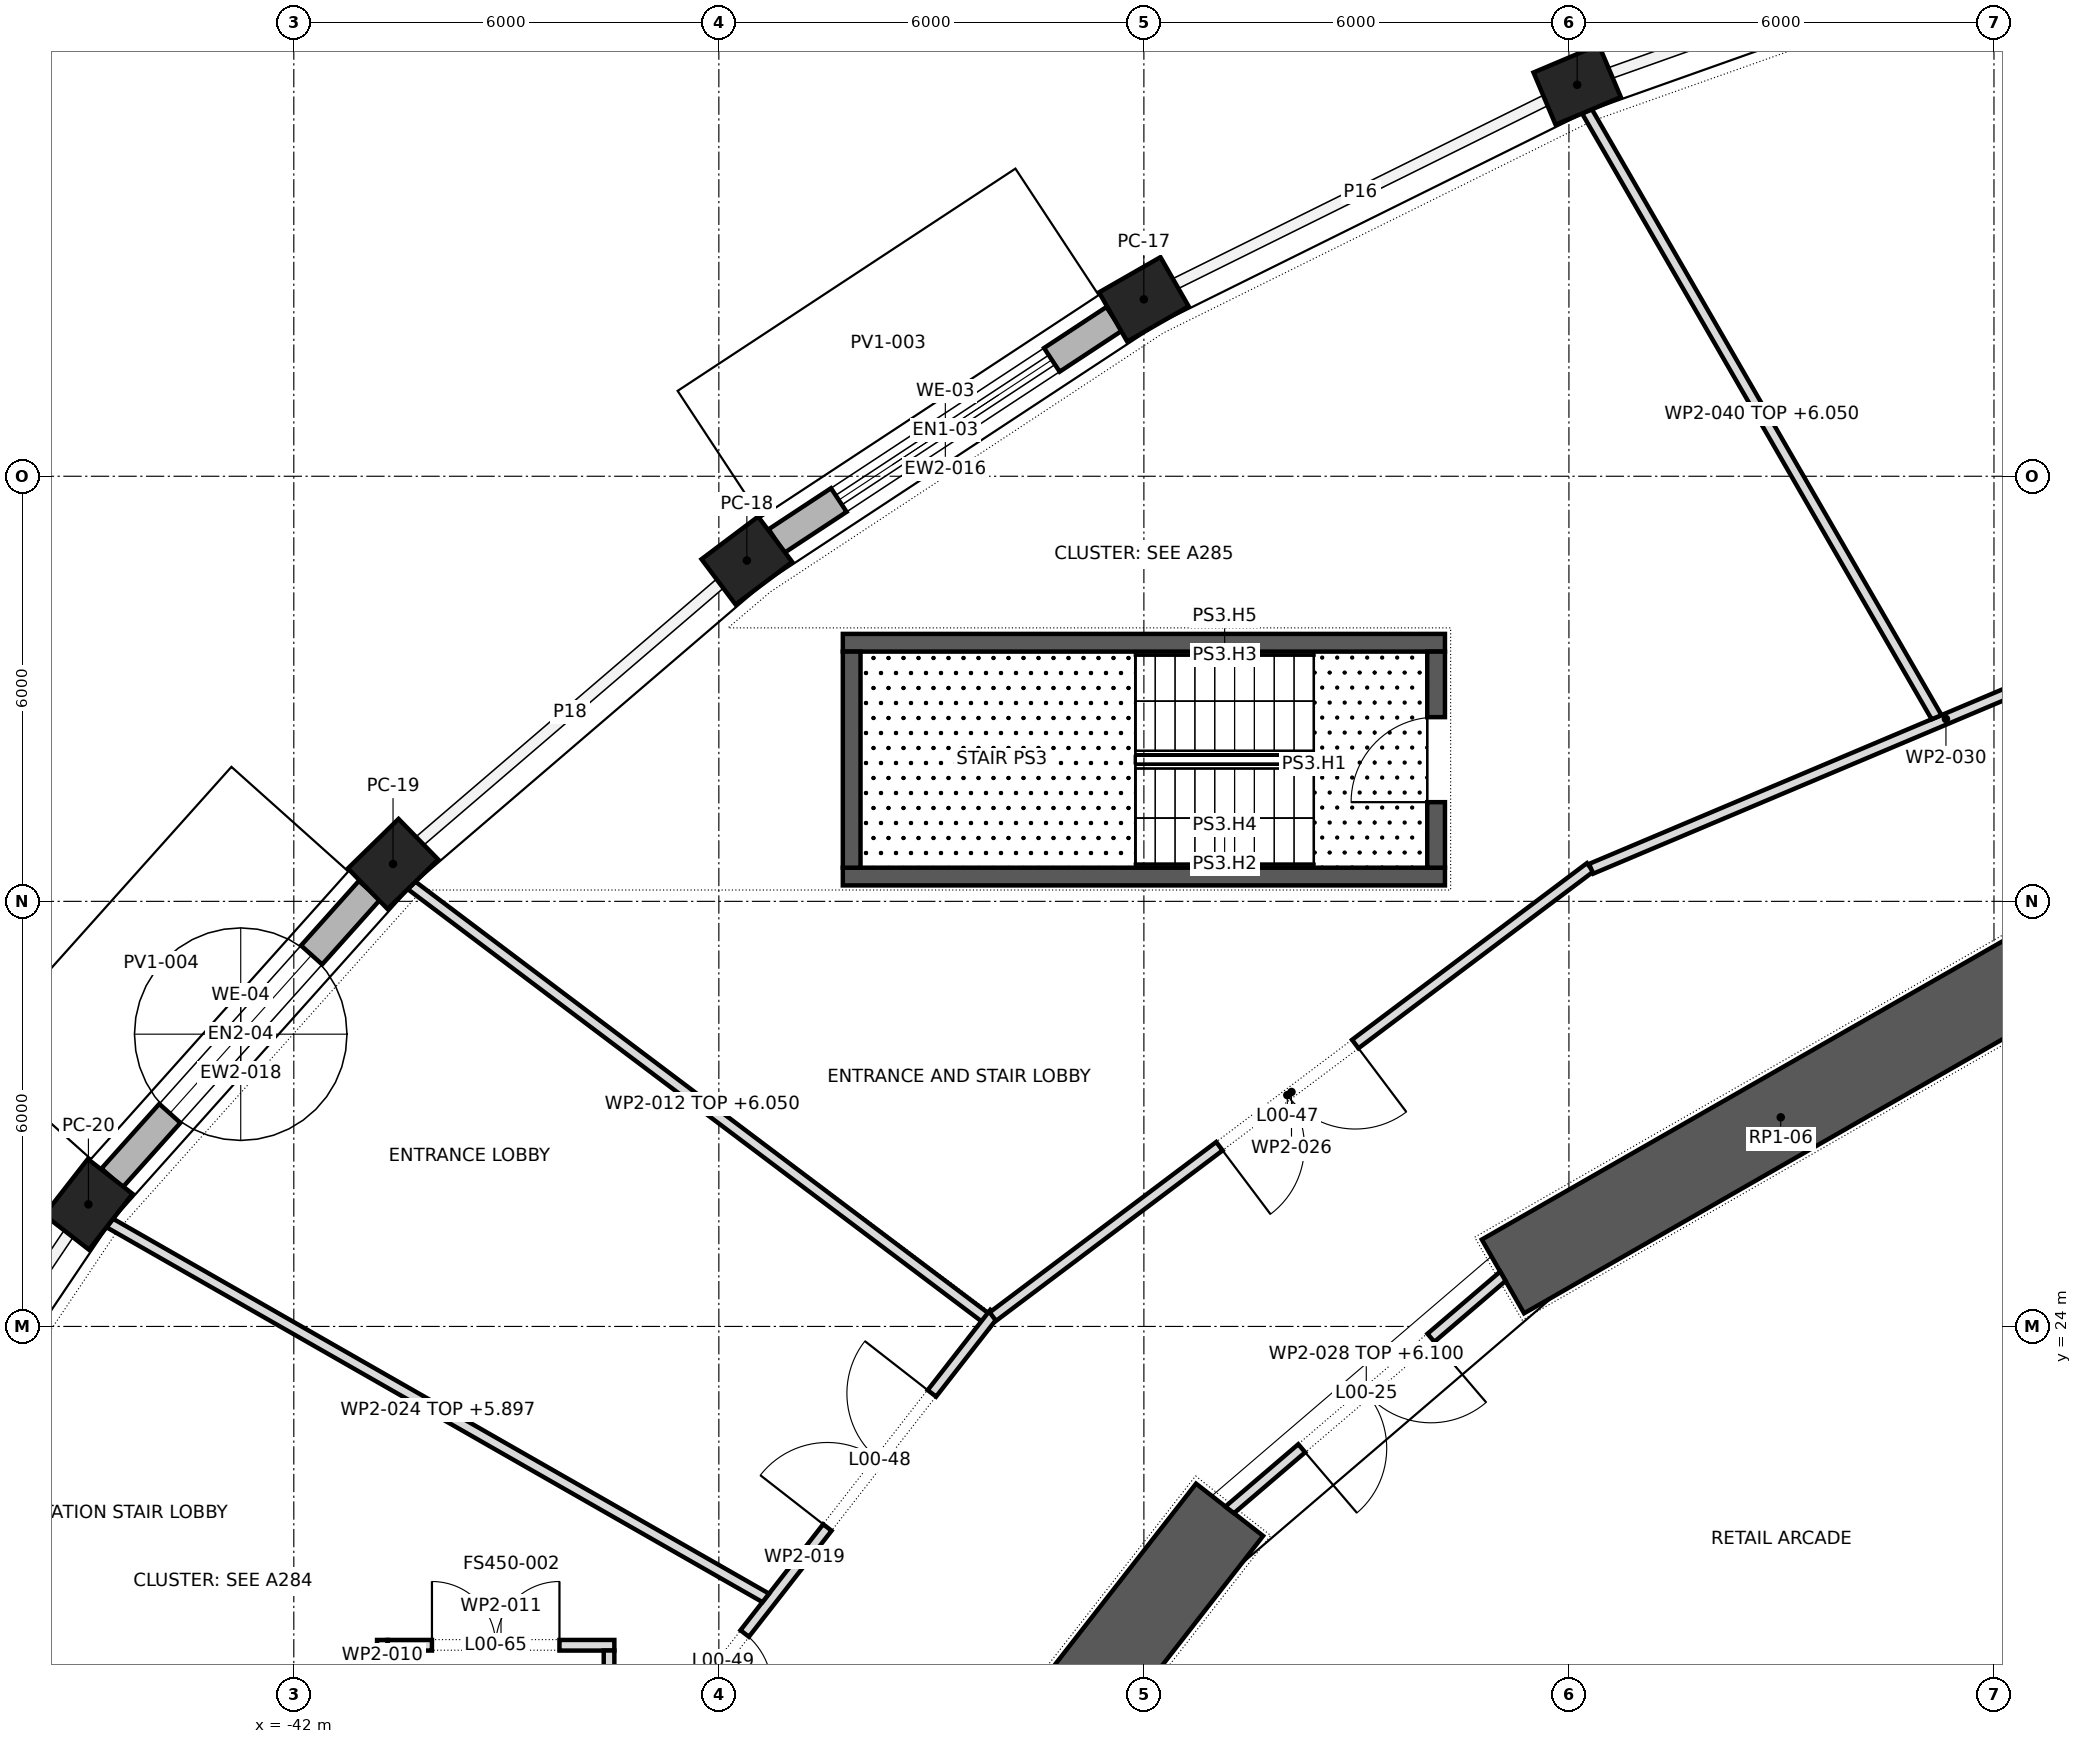
"""IFC4 building model, lengths in metres.
Left out: names, types, materials, properties, quantities, classifications, styles, units other than length and angle.
Written with IfcOpenShell. Run it as: python <this file> out.ifc"""

import sys

from ifc_helpers import new_model, si_unit, direction, frame, frame_2d, origin, origin_2d, place, context, subcontext, project, spatial, polyline, rectangle, outline, extrude, element, fill, save


model = new_model("IFC4")
c1 = context("Model", 3, precision=1e-05, world=origin(), true_north=direction((0.0, 1.0)))
c2 = subcontext(c1, "Body", "Model", "MODEL_VIEW")
j1 = project(units=[si_unit("LENGTHUNIT", "METRE"), si_unit("PLANEANGLEUNIT", "RADIAN")], contexts=[c1])
p1 = place(None, origin())
s1 = spatial("IfcSite", under=j1, at=p1, CompositionType="ELEMENT")
p2 = place(p1, origin())
s2 = spatial("IfcBuilding", under=s1, at=p2, CompositionType="ELEMENT")
p3 = place(p2, origin())
s3 = spatial("IfcBuildingStorey", under=s2, at=p3, CompositionType="ELEMENT", Elevation=0.0)
for number, where, z_axis, x_axis in (
    (1, (-23.884, 41.525, 0.0), (0.0, 0.0, 1.0), (-0.921, -0.389, 0.0)),
    (2, (-30.001, 38.497, 0.0), (0.0, 0.0, 1.0), (-0.868, -0.497, 0.0)),
    (3, (-35.605, 34.81, 0.0), (0.0, 0.0, 1.0), (-0.799, -0.601, 0.0)),
    (4, (-40.599, 30.528, 0.0), (0.0, 0.0, 1.0), (-0.715, -0.699, 0.0)),
    (5, (-44.899, 25.723, 0.0), (0.0, 0.0, 1.0), (-0.615, -0.789, 0.0)),
):
    element("IfcColumn", number, at=place(p3, frame(where, z_axis=z_axis, x_axis=x_axis)), inside=s3, PredefinedType="COLUMN", context=c2, shape_type="SweptSolid", body=[
        extrude(rectangle(XDim=1.0, YDim=0.8, at=origin_2d()), origin(), (0.0, 0.0, 1.0), 7.0),
    ])
p4 = place(p3, frame((-17.089, 29.198, 0.0), z_axis=(0.0, 0.0, 1.0), x_axis=(-0.867760656864, -0.496982336103, 0.0)))
e6 = element("IfcWall", 6, at=p4, inside=s3, PredefinedType="SHEAR", context=c2, shape_type="SweptSolid", body=[
    extrude(rectangle(XDim=9.038, YDim=1.2, at=frame_2d((4.519, 0.0))), origin(), (0.0, 0.0, 1.0), 7.0),
])
p5 = place(p3, frame((-28.79, 21.412, 0.0), z_axis=(0.0, 0.0, 1.0), x_axis=(-0.614825322247, -0.788663314174, 0.0)))
e7 = element("IfcWall", 7, at=p5, inside=s3, PredefinedType="SHEAR", context=c2, shape_type="SweptSolid", body=[
    extrude(rectangle(XDim=8.632, YDim=1.2, at=frame_2d((4.316, 0.0))), origin(), (0.0, 0.0, 1.0), 7.0),
])
p6 = place(p3, frame((-30.418, 38.222, 0.0), z_axis=(0.0, 0.0, 1.0), x_axis=(-0.835417082244, -0.549616501476, 0.0)))
e8 = element("IfcWall", 8, at=p6, inside=s3, PredefinedType="STANDARD", context=c2, shape_type="SweptSolid", body=[
    extrude(rectangle(XDim=5.708, YDim=0.4, at=frame_2d((2.854, 0.0))), origin(), (0.0, 0.0, 1.0), 6.2),
])
p7 = place(p6, frame((1.054, 0.0, 0.0)))
e9 = element("IfcOpeningElement", 9, at=p7, cuts=e8, PredefinedType="OPENING", context=c2, shape_type="SweptSolid", body=[
    extrude(rectangle(XDim=3.6, YDim=3.0, at=frame_2d((1.8, 1.5))), frame((0.0, 0.212, 0.0), z_axis=(0.0, -1.0, 0.0), x_axis=(1.0, 0.0, 0.0)), (0.0, 0.0, 1.0), 0.424),
])
p8 = place(p6, frame((1.054, 0.0, 3.45)))
e10 = element("IfcOpeningElement", 10, at=p8, cuts=e8, PredefinedType="OPENING", context=c2, shape_type="SweptSolid", body=[
    extrude(rectangle(XDim=3.6, YDim=2.25, at=frame_2d((1.8, 1.125))), frame((0.0, 0.212, 0.0), z_axis=(0.0, -1.0, 0.0), x_axis=(1.0, 0.0, 0.0)), (0.0, 0.0, 1.0), 0.424),
])
p9 = place(p3, frame((-40.933, 30.155, 0.0), z_axis=(0.0, 0.0, 1.0), x_axis=(-0.666902265084, -0.745145199827, 0.0)))
e11 = element("IfcWall", 11, at=p9, inside=s3, PredefinedType="STANDARD", context=c2, shape_type="SweptSolid", body=[
    extrude(rectangle(XDim=5.448, YDim=0.4, at=frame_2d((2.724, 0.0))), origin(), (0.0, 0.0, 1.0), 6.2),
])
p10 = place(p9, frame((1.224, 0.0, 0.0)))
e12 = element("IfcOpeningElement", 12, at=p10, cuts=e11, PredefinedType="OPENING", context=c2, shape_type="SweptSolid", body=[
    extrude(rectangle(XDim=3.0, YDim=3.0, at=frame_2d((1.5, 1.5))), frame((0.0, 0.212, 0.0), z_axis=(0.0, -1.0, 0.0), x_axis=(1.0, 0.0, 0.0)), (0.0, 0.0, 1.0), 0.424),
])
p11 = place(p9, frame((1.224, 0.0, 3.45)))
e13 = element("IfcOpeningElement", 13, at=p11, cuts=e11, PredefinedType="OPENING", context=c2, shape_type="SweptSolid", body=[
    extrude(rectangle(XDim=3.0, YDim=2.25, at=frame_2d((1.5, 1.125))), frame((0.0, 0.212, 0.0), z_axis=(0.0, -1.0, 0.0), x_axis=(1.0, 0.0, 0.0)), (0.0, 0.0, 1.0), 0.424),
])
for number, where, z_axis, x_axis in (
    (14, (-34.25, 33.65, 0.0), (0.0, 0.0, 1.0), (1.0, 0.0, 0.0)),
    (15, (-34.25, 30.35, 0.0), (0.0, 0.0, 1.0), (1.0, 0.0, 0.0)),
):
    element("IfcWall", number, at=place(p3, frame(where, z_axis=z_axis, x_axis=x_axis)), inside=s3, PredefinedType="SHEAR", context=c2, shape_type="SweptSolid", body=[
        extrude(rectangle(XDim=8.5, YDim=0.25, at=frame_2d((4.25, 0.0))), origin(), (0.0, 0.0, 1.0), 6.65),
    ])
p12 = place(p3, frame((-34.125, 30.475, 0.0), z_axis=(0.0, 0.0, 1.0), x_axis=(0.0, 1.0, 0.0)))
e16 = element("IfcWall", 16, at=p12, inside=s3, PredefinedType="SHEAR", context=c2, shape_type="SweptSolid", body=[
    extrude(rectangle(XDim=3.05, YDim=0.25, at=frame_2d((1.525, 0.0))), origin(), (0.0, 0.0, 1.0), 6.65),
])
p13 = place(p3, frame((-25.875, 30.475, 0.0), z_axis=(0.0, 0.0, 1.0), x_axis=(0.0, 1.0, 0.0)))
e17 = element("IfcWall", 17, at=p13, inside=s3, PredefinedType="SHEAR", context=c2, shape_type="SweptSolid", body=[
    extrude(rectangle(XDim=3.05, YDim=0.25, at=frame_2d((1.525, 0.0))), origin(), (0.0, 0.0, 1.0), 6.65),
])
p14 = place(p13, frame((0.925, 0.0, 0.0)))
e18 = element("IfcOpeningElement", 18, at=p14, cuts=e17, PredefinedType="OPENING", context=c2, shape_type="SweptSolid", body=[
    extrude(rectangle(XDim=1.2, YDim=2.1, at=frame_2d((0.6, 1.05))), frame((0.0, 0.137, 0.0), z_axis=(0.0, -1.0, 0.0), x_axis=(1.0, 0.0, 0.0)), (0.0, 0.0, 1.0), 0.274),
])
p15 = place(p3, frame((-40.75, 19.15, 0.0), z_axis=(0.0, 0.0, 1.0), x_axis=(0.0, 1.0, 0.0)))
e19 = element("IfcWall", 19, at=p15, inside=s3, PredefinedType="PARTITIONING", context=c2, shape_type="SweptSolid", body=[
    extrude(rectangle(XDim=0.425, YDim=0.15, at=frame_2d((0.212, 0.0))), origin(), (0.0, 0.0, 1.0), 6.65),
])
p16 = place(p3, frame((-40.675, 19.5, 0.0), z_axis=(0.0, 0.0, 1.0), x_axis=(1.0, 0.0, 0.0)))
e20 = element("IfcWall", 20, at=p16, inside=s3, PredefinedType="PARTITIONING", context=c2, shape_type="SweptSolid", body=[
    extrude(rectangle(XDim=3.2, YDim=0.15, at=frame_2d((1.6, 0.0))), origin(), (0.0, 0.0, 1.0), 6.65),
])
p17 = place(p16, frame((0.625, 0.0, 0.0)))
e21 = element("IfcOpeningElement", 21, at=p17, cuts=e20, PredefinedType="OPENING", context=c2, shape_type="SweptSolid", body=[
    extrude(rectangle(XDim=1.8, YDim=2.1, at=frame_2d((0.9, 1.05))), frame((0.0, 0.087, 0.0), z_axis=(0.0, -1.0, 0.0), x_axis=(1.0, 0.0, 0.0)), (0.0, 0.0, 1.0), 0.174),
])
p18 = place(p3, frame((-40.338, 30.225, 0.0), z_axis=(0.0, 0.0, 1.0), x_axis=(0.798789212221, -0.601610999267, 0.0)))
e22 = element("IfcWall", 22, at=p18, inside=s3, PredefinedType="PARTITIONING", context=c2, shape_type="SweptSolid", body=[
    extrude(outline(polyline([(-0.011, -0.075), (10.273, -0.075), (10.273, 0.075), (0.011, 0.075), (-0.011, -0.075)])), origin(), (0.0, 0.0, 1.0), 6.05),
])
p19 = place(p3, frame((-37.55, 15.075, 0.0), z_axis=(0.0, 0.0, 1.0), x_axis=(0.0, 1.0, 0.0)))
e23 = element("IfcWall", 23, at=p19, inside=s3, PredefinedType="PARTITIONING", context=c2, shape_type="SweptSolid", body=[
    extrude(rectangle(XDim=4.351, YDim=0.15, at=frame_2d((2.176, 0.0))), origin(), (0.0, 0.0, 1.0), 6.65),
])
p20 = place(p3, frame((-37.476, 17.305, 0.0), z_axis=(0.0, 0.0, 1.0), x_axis=(0.614894762304, 0.788609175252, 0.0)))
e24 = element("IfcWall", 24, at=p20, inside=s3, PredefinedType="PARTITIONING", context=c2, shape_type="SweptSolid", body=[
    extrude(rectangle(XDim=8.729, YDim=0.15, at=frame_2d((4.365, 0.0))), origin(), (0.0, 0.0, 1.0), 6.65),
])
p21 = place(p20, frame((4.891, 0.0, 0.0)))
e25 = element("IfcOpeningElement", 25, at=p21, cuts=e24, PredefinedType="OPENING", context=c2, shape_type="SweptSolid", body=[
    extrude(rectangle(XDim=2.4, YDim=2.1, at=frame_2d((1.2, 1.05))), frame((0.0, 0.087, 0.0), z_axis=(0.0, -1.0, 0.0), x_axis=(1.0, 0.0, 0.0)), (0.0, 0.0, 1.0), 0.174),
])
p22 = place(p20, frame((1.993, 0.0, 0.0)))
e26 = element("IfcOpeningElement", 26, at=p22, cuts=e24, PredefinedType="OPENING", context=c2, shape_type="SweptSolid", body=[
    extrude(rectangle(XDim=1.0, YDim=2.1, at=frame_2d((0.5, 1.05))), frame((0.0, 0.087, 0.0), z_axis=(0.0, -1.0, 0.0), x_axis=(1.0, 0.0, 0.0)), (0.0, 0.0, 1.0), 0.174),
])
p23 = place(p3, frame((-35.337, 20.168, 0.0), z_axis=(0.0, 0.0, 1.0), x_axis=(-0.868241733504, 0.496141403435, 0.0)))
e27 = element("IfcWall", 27, at=p23, inside=s3, PredefinedType="PARTITIONING", context=c2, shape_type="SweptSolid", body=[
    extrude(outline(polyline([(-0.011, -0.075), (10.655, -0.075), (10.677, 0.075), (0.011, 0.075), (-0.011, -0.075)])), origin(), (0.0, 0.0, 1.0), 5.897),
])
p24 = place(p3, frame((-32.132, 24.139, 0.0), z_axis=(0.0, 0.0, 1.0), x_axis=(0.799199441693, 0.601065930158, 0.0)))
e28 = element("IfcWall", 28, at=p24, inside=s3, PredefinedType="PARTITIONING", context=c2, shape_type="SweptSolid", body=[
    extrude(rectangle(XDim=10.549, YDim=0.15, at=frame_2d((5.274, 0.0))), origin(), (0.0, 0.0, 1.0), 6.65),
])
p25 = place(p24, frame((4.001, 0.0, 0.0)))
e29 = element("IfcOpeningElement", 29, at=p25, cuts=e28, PredefinedType="OPENING", context=c2, shape_type="SweptSolid", body=[
    extrude(rectangle(XDim=2.4, YDim=2.1, at=frame_2d((1.2, 1.05))), frame((0.0, 0.087, 0.0), z_axis=(0.0, -1.0, 0.0), x_axis=(1.0, 0.0, 0.0)), (0.0, 0.0, 1.0), 0.174),
])
p26 = place(p3, frame((-28.789, 21.411, 0.0), z_axis=(0.0, 0.0, 1.0), x_axis=(0.760084552743, 0.649824185978, 0.0)))
e30 = element("IfcWall", 30, at=p26, inside=s3, PredefinedType="PARTITIONING", context=c2, shape_type="SweptSolid", body=[
    extrude(outline(polyline([(0.015, -0.075), (5.061, -0.075), (5.089, 0.075), (-0.015, 0.075), (0.015, -0.075)])), origin(), (0.0, 0.0, 1.0), 6.1),
])
p27 = place(p26, frame((1.338, 0.0, 0.0)))
e31 = element("IfcOpeningElement", 31, at=p27, cuts=e30, PredefinedType="OPENING", context=c2, shape_type="SweptSolid", body=[
    extrude(rectangle(XDim=2.4, YDim=2.1, at=frame_2d((1.2, 1.05))), frame((0.0, 0.087, 0.0), z_axis=(0.0, -1.0, 0.0), x_axis=(1.0, 0.0, 0.0)), (0.0, 0.0, 1.0), 0.174),
])
p28 = place(p3, frame((-23.687, 30.459, 0.0), z_axis=(0.0, 0.0, 1.0), x_axis=(0.921275306177, 0.388911056964, 0.0)))
e32 = element("IfcWall", 32, at=p28, inside=s3, PredefinedType="PARTITIONING", context=c2, shape_type="SweptSolid", body=[
    extrude(rectangle(XDim=10.873, YDim=0.15, at=frame_2d((5.437, 0.0))), origin(), (0.0, 0.0, 1.0), 6.65),
])
p29 = place(p3, frame((-18.81, 32.599, 0.0), z_axis=(0.0, 0.0, 1.0), x_axis=(-0.499854452602, 0.866109419308, 0.0)))
e33 = element("IfcWall", 33, at=p29, inside=s3, PredefinedType="PARTITIONING", context=c2, shape_type="SweptSolid", body=[
    extrude(outline(polyline([(-0.009, -0.075), (9.864, -0.075), (9.883, 0.075), (0.009, 0.075), (-0.009, -0.075)])), origin(), (0.0, 0.0, 1.0), 6.05),
])
p30 = place(p7, frame((3.6, 0.0, 0.0), z_axis=(0.0, 0.0, 1.0), x_axis=(-1.0, 0.0, 0.0)))
e34 = element("IfcDoor", 34, at=p30, inside=s3, OperationType="DOUBLE_DOOR_SLIDING", PredefinedType="DOOR", context=c2, shape_type="SweptSolid", body=[
    extrude(rectangle(XDim=3.6, YDim=3.0, at=frame_2d((1.8, 1.5))), frame((0.0, 0.025, 0.0), z_axis=(0.0, -1.0, 0.0), x_axis=(1.0, 0.0, 0.0)), (0.0, 0.0, 1.0), 0.05),
])
fill(e9, e34)
p31 = place(p8, origin())
e35 = element("IfcWindow", 35, at=p31, inside=s3, PartitioningType="TRIPLE_PANEL_VERTICAL", PredefinedType="WINDOW", context=c2, shape_type="SweptSolid", body=[
    extrude(rectangle(XDim=3.6, YDim=2.25, at=frame_2d((1.8, 1.125))), frame((0.0, 0.03, 0.0), z_axis=(0.0, -1.0, 0.0), x_axis=(1.0, 0.0, 0.0)), (0.0, 0.0, 1.0), 0.06),
])
fill(e10, e35)
p32 = place(p10, frame((3.0, 0.0, 0.0), z_axis=(0.0, 0.0, 1.0), x_axis=(-1.0, 0.0, 0.0)))
e36 = element("IfcDoor", 36, at=p32, inside=s3, OperationType="REVOLVING", PredefinedType="DOOR", context=c2, shape_type="SweptSolid", body=[
    extrude(rectangle(XDim=3.0, YDim=3.0, at=frame_2d((1.5, 1.5))), frame((0.0, 0.025, 0.0), z_axis=(0.0, -1.0, 0.0), x_axis=(1.0, 0.0, 0.0)), (0.0, 0.0, 1.0), 0.05),
])
fill(e12, e36)
p33 = place(p11, origin())
e37 = element("IfcWindow", 37, at=p33, inside=s3, PartitioningType="DOUBLE_PANEL_VERTICAL", PredefinedType="WINDOW", context=c2, shape_type="SweptSolid", body=[
    extrude(rectangle(XDim=3.0, YDim=2.25, at=frame_2d((1.5, 1.125))), frame((0.0, 0.03, 0.0), z_axis=(0.0, -1.0, 0.0), x_axis=(1.0, 0.0, 0.0)), (0.0, 0.0, 1.0), 0.06),
])
fill(e13, e37)
p34 = place(p14, origin())
e38 = element("IfcDoor", 38, at=p34, inside=s3, OperationType="SINGLE_SWING_RIGHT", PredefinedType="DOOR", context=c2, shape_type="SweptSolid", body=[
    extrude(rectangle(XDim=1.2, YDim=2.1, at=frame_2d((0.6, 1.05))), frame((0.0, 0.025, 0.0), z_axis=(0.0, -1.0, 0.0), x_axis=(1.0, 0.0, 0.0)), (0.0, 0.0, 1.0), 0.05),
])
fill(e18, e38)
p35 = place(p27, frame((2.4, 0.0, 0.0), z_axis=(0.0, 0.0, 1.0), x_axis=(-1.0, 0.0, 0.0)))
e39 = element("IfcDoor", 39, at=p35, inside=s3, OperationType="DOUBLE_DOOR_SINGLE_SWING", PredefinedType="DOOR", context=c2, shape_type="SweptSolid", body=[
    extrude(rectangle(XDim=2.4, YDim=2.1, at=frame_2d((1.2, 1.05))), frame((0.0, 0.025, 0.0), z_axis=(0.0, -1.0, 0.0), x_axis=(1.0, 0.0, 0.0)), (0.0, 0.0, 1.0), 0.05),
])
fill(e31, e39)
p36 = place(p25, frame((2.4, 0.0, 0.0), z_axis=(0.0, 0.0, 1.0), x_axis=(-1.0, 0.0, 0.0)))
e40 = element("IfcDoor", 40, at=p36, inside=s3, OperationType="DOUBLE_DOOR_SINGLE_SWING", PredefinedType="DOOR", context=c2, shape_type="SweptSolid", body=[
    extrude(rectangle(XDim=2.4, YDim=2.1, at=frame_2d((1.2, 1.05))), frame((0.0, 0.025, 0.0), z_axis=(0.0, -1.0, 0.0), x_axis=(1.0, 0.0, 0.0)), (0.0, 0.0, 1.0), 0.05),
])
fill(e29, e40)
p37 = place(p21, origin())
e41 = element("IfcDoor", 41, at=p37, inside=s3, OperationType="DOUBLE_DOOR_SINGLE_SWING", PredefinedType="DOOR", context=c2, shape_type="SweptSolid", body=[
    extrude(rectangle(XDim=2.4, YDim=2.1, at=frame_2d((1.2, 1.05))), frame((0.0, 0.025, 0.0), z_axis=(0.0, -1.0, 0.0), x_axis=(1.0, 0.0, 0.0)), (0.0, 0.0, 1.0), 0.05),
])
fill(e25, e41)
p38 = place(p22, frame((1.0, 0.0, 0.0), z_axis=(0.0, 0.0, 1.0), x_axis=(-1.0, 0.0, 0.0)))
e42 = element("IfcDoor", 42, at=p38, inside=s3, OperationType="SINGLE_SWING_LEFT", PredefinedType="DOOR", context=c2, shape_type="SweptSolid", body=[
    extrude(rectangle(XDim=1.0, YDim=2.1, at=frame_2d((0.5, 1.05))), frame((0.0, 0.025, 0.0), z_axis=(0.0, -1.0, 0.0), x_axis=(1.0, 0.0, 0.0)), (0.0, 0.0, 1.0), 0.05),
])
fill(e26, e42)
p39 = place(p17, origin())
e43 = element("IfcDoor", 43, at=p39, inside=s3, OperationType="DOUBLE_DOOR_SINGLE_SWING", PredefinedType="DOOR", context=c2, shape_type="SweptSolid", body=[
    extrude(rectangle(XDim=1.8, YDim=2.1, at=frame_2d((0.9, 1.05))), frame((0.0, 0.025, 0.0), z_axis=(0.0, -1.0, 0.0), x_axis=(1.0, 0.0, 0.0)), (0.0, 0.0, 1.0), 0.05),
])
fill(e21, e43)
save(model, sys.argv[1])
